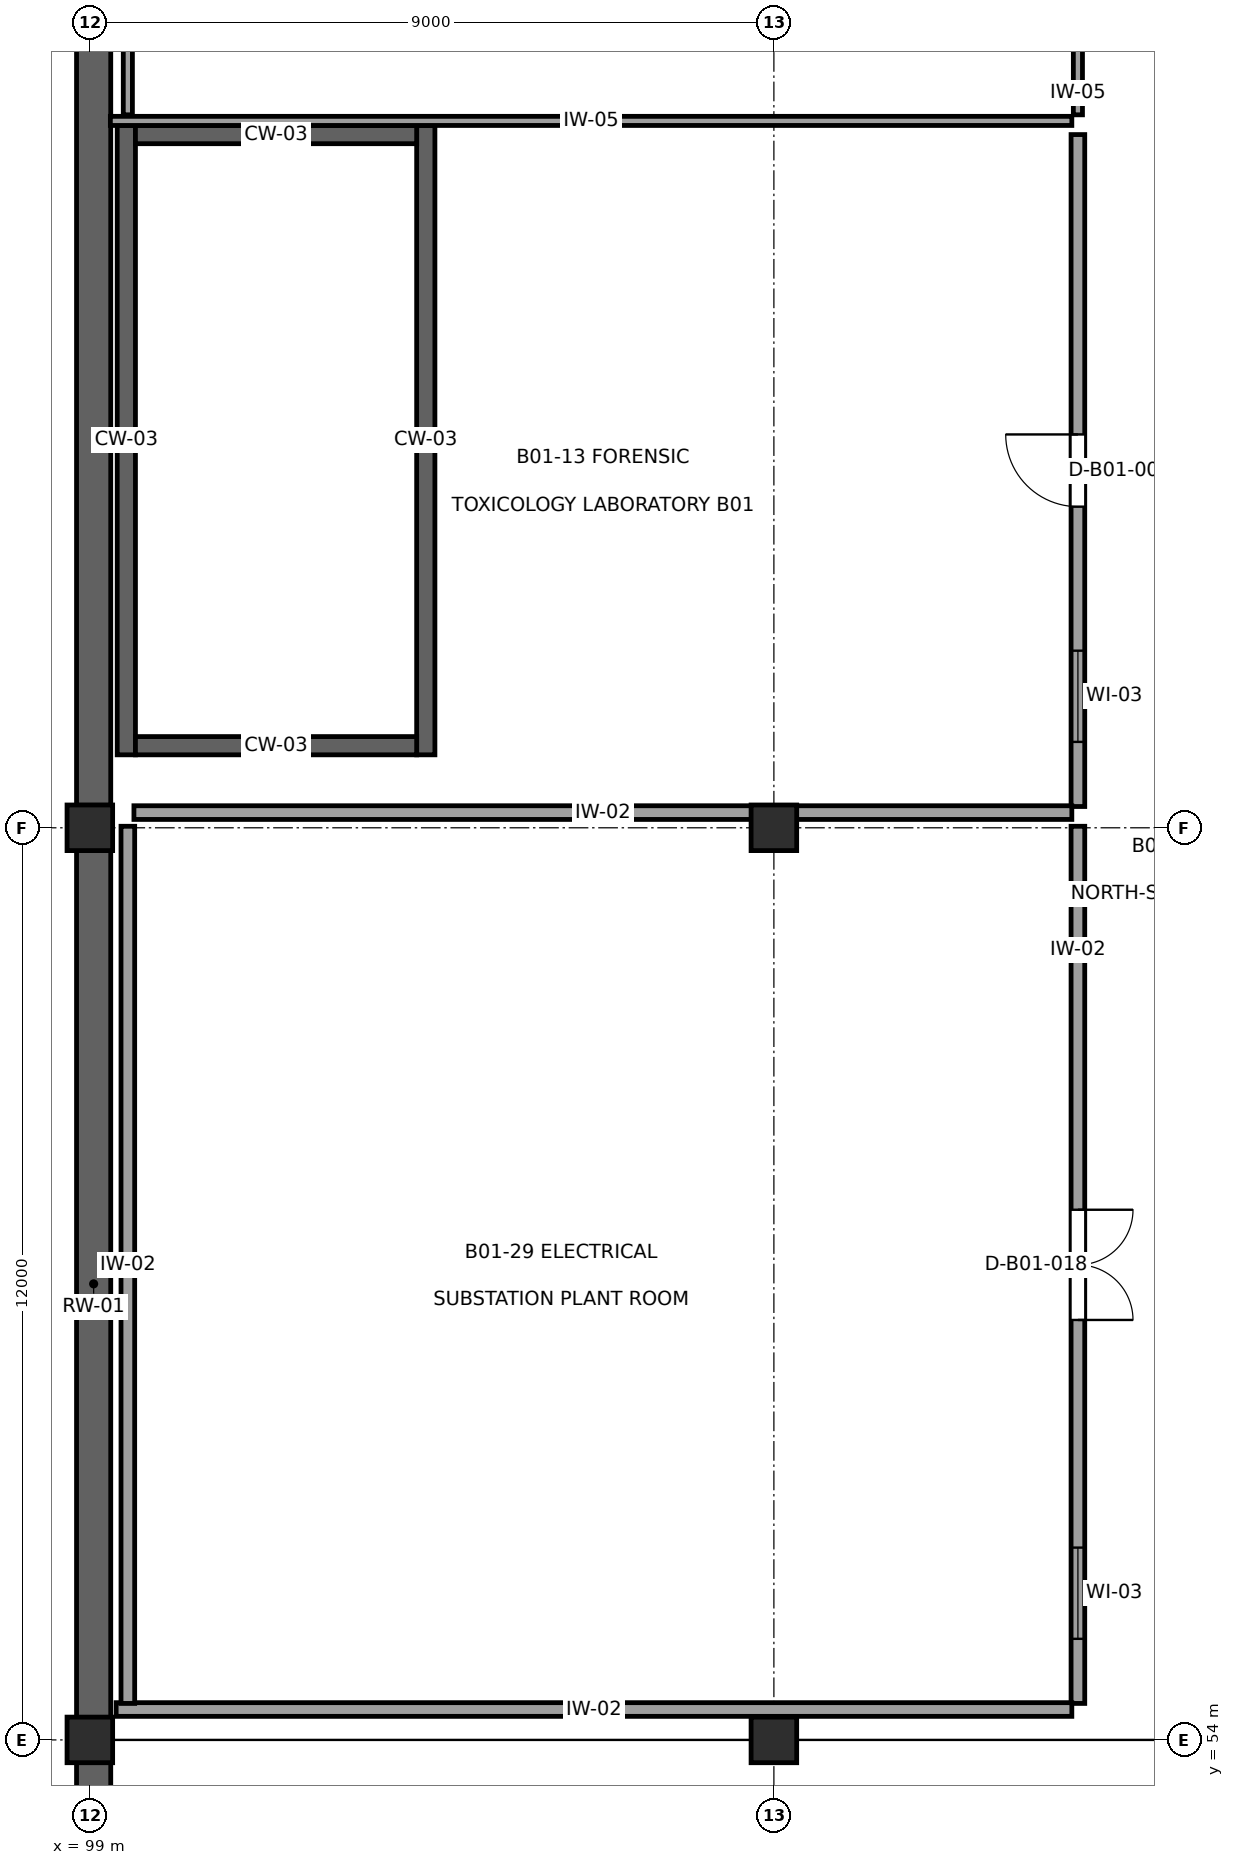
"""IFC4 building model, lengths in metres.
Left out: names, types, materials, properties, quantities, classifications, styles, units other than length and angle.
Written with IfcOpenShell. Run it as: python <this file> out.ifc"""

import sys

from ifc_helpers import new_model, si_unit, direction, frame, frame_2d, origin, origin_2d, place, context, subcontext, project, spatial, rectangle, extrude, element, fill, save


model = new_model("IFC4")
c1 = context("Model", 3, precision=1e-05, world=origin(), true_north=direction((0.0, 1.0)))
c2 = subcontext(c1, "Body", "Model", "MODEL_VIEW")
j1 = project(units=[si_unit("LENGTHUNIT", "METRE"), si_unit("PLANEANGLEUNIT", "RADIAN")], contexts=[c1])
p1 = place(None, origin())
s1 = spatial("IfcSite", under=j1, at=p1, CompositionType="ELEMENT")
p2 = place(p1, origin())
s2 = spatial("IfcBuilding", under=s1, at=p2, CompositionType="ELEMENT")
p3 = place(p2, frame((0.0, 0.0, -4.5)))
s3 = spatial("IfcBuildingStorey", under=s2, at=p3, CompositionType="ELEMENT", Elevation=-4.5)
for number, where, z_axis, x_axis in (
    (1, (99.0, 54.0, 0.0), (0.0, 0.0, 1.0), (1.0, 0.0, 0.0)),
    (2, (99.0, 66.0, 0.0), (0.0, 0.0, 1.0), (1.0, 0.0, 0.0)),
    (3, (108.0, 54.0, 0.0), (0.0, 0.0, 1.0), (1.0, 0.0, 0.0)),
    (4, (108.0, 66.0, 0.0), (0.0, 0.0, 1.0), (1.0, 0.0, 0.0)),
):
    element("IfcColumn", number, at=place(p3, frame(where, z_axis=z_axis, x_axis=x_axis)), inside=s3, PredefinedType="COLUMN", context=c2, shape_type="SweptSolid", body=[
        extrude(rectangle(XDim=0.6, YDim=0.6, at=origin_2d()), origin(), (0.0, 0.0, 1.0), 4.5),
    ])
p4 = place(p3, frame((99.05, 77.654, 0.0), z_axis=(0.0, 0.0, 1.0), x_axis=(0.0, -1.0, 0.0)))
e5 = element("IfcWall", 5, at=p4, inside=s3, PredefinedType="USERDEFINED", context=c2, shape_type="SweptSolid", body=[
    extrude(rectangle(XDim=11.358, YDim=0.45, at=frame_2d((5.679, 0.0))), origin(), (0.0, 0.0, 1.0), 4.32),
])
p5 = place(p3, frame((99.05, 65.704, 0.0), z_axis=(0.0, 0.0, 1.0), x_axis=(0.0, -1.0, 0.0)))
e6 = element("IfcWall", 6, at=p5, inside=s3, PredefinedType="USERDEFINED", context=c2, shape_type="SweptSolid", body=[
    extrude(rectangle(XDim=11.408, YDim=0.45, at=frame_2d((5.704, 0.0))), origin(), (0.0, 0.0, 1.0), 4.32),
])
p6 = place(p3, frame((99.05, 53.704, 0.0), z_axis=(0.0, 0.0, 1.0), x_axis=(0.0, -1.0, 0.0)))
e7 = element("IfcWall", 7, at=p6, inside=s3, PredefinedType="USERDEFINED", context=c2, shape_type="SweptSolid", body=[
    extrude(rectangle(XDim=11.358, YDim=0.45, at=frame_2d((5.679, 0.0))), origin(), (0.0, 0.0, 1.0), 4.32),
])
for number, where, z_axis, x_axis in (
    (8, (99.48, 66.96, 0.0), (0.0, 0.0, 1.0), (0.0, 1.0, 0.0)),
    (9, (103.42, 66.96, 0.0), (0.0, 0.0, 1.0), (0.0, 1.0, 0.0)),
):
    element("IfcWall", number, at=place(p3, frame(where, z_axis=z_axis, x_axis=x_axis)), inside=s3, PredefinedType="SHEAR", context=c2, shape_type="SweptSolid", body=[
        extrude(rectangle(XDim=8.28, YDim=0.24, at=frame_2d((4.14, 0.0))), origin(), (0.0, 0.0, 1.0), 4.31),
    ])
for number, where, z_axis, x_axis in (
    (10, (99.6, 67.08, 0.0), (0.0, 0.0, 1.0), (1.0, 0.0, 0.0)),
    (11, (99.6, 75.12, 0.0), (0.0, 0.0, 1.0), (1.0, 0.0, 0.0)),
):
    element("IfcWall", number, at=place(p3, frame(where, z_axis=z_axis, x_axis=x_axis)), inside=s3, PredefinedType="SHEAR", context=c2, shape_type="SweptSolid", body=[
        extrude(rectangle(XDim=3.7, YDim=0.24, at=frame_2d((1.85, 0.0))), origin(), (0.0, 0.0, 1.0), 4.31),
    ])
p7 = place(p3, frame((99.5, 75.38, 0.0), z_axis=(0.0, 0.0, 1.0), x_axis=(0.0, 1.0, 0.0)))
e12 = element("IfcWall", 12, at=p7, inside=s3, PredefinedType="PARTITIONING", context=c2, shape_type="SweptSolid", body=[
    extrude(rectangle(XDim=5.04, YDim=0.12, at=frame_2d((2.52, 0.0))), origin(), (0.0, 0.0, 1.0), 3.715),
])
p8 = place(p3, frame((112.0, 80.42, 0.0), z_axis=(0.0, 0.0, 1.0), x_axis=(0.0, -1.0, 0.0)))
e13 = element("IfcWall", 13, at=p8, inside=s3, PredefinedType="PARTITIONING", context=c2, shape_type="SweptSolid", body=[
    extrude(rectangle(XDim=5.04, YDim=0.12, at=frame_2d((2.52, 0.0))), origin(), (0.0, 0.0, 1.0), 4.14),
])
p9 = place(p8, frame((2.07, 0.0, 0.0)))
e14 = element("IfcOpeningElement", 14, at=p9, cuts=e13, PredefinedType="OPENING", context=c2, shape_type="SweptSolid", body=[
    extrude(rectangle(XDim=0.9, YDim=2.1, at=frame_2d((0.45, 1.05))), frame((0.0, 0.075, 0.0), z_axis=(0.0, -1.0, 0.0), x_axis=(1.0, 0.0, 0.0)), (0.0, 0.0, 1.0), 0.15),
])
p10 = place(p3, frame((111.92, 75.3, 0.0), z_axis=(0.0, 0.0, 1.0), x_axis=(-1.0, 0.0, 0.0)))
e15 = element("IfcWall", 15, at=p10, inside=s3, PredefinedType="PARTITIONING", context=c2, shape_type="SweptSolid", body=[
    extrude(rectangle(XDim=12.65, YDim=0.12, at=frame_2d((6.325, 0.0))), origin(), (0.0, 0.0, 1.0), 4.14),
])
p11 = place(p3, frame((112.0, 75.12, 0.0), z_axis=(0.0, 0.0, 1.0), x_axis=(0.0, -1.0, 0.0)))
e16 = element("IfcWall", 16, at=p11, inside=s3, PredefinedType="PARTITIONING", context=c2, shape_type="SweptSolid", body=[
    extrude(rectangle(XDim=8.84, YDim=0.18, at=frame_2d((4.42, 0.0))), origin(), (0.0, 0.0, 1.0), 4.14),
])
p12 = place(p11, frame((3.945, 0.0, 0.0)))
e17 = element("IfcOpeningElement", 17, at=p12, cuts=e16, PredefinedType="OPENING", context=c2, shape_type="SweptSolid", body=[
    extrude(rectangle(XDim=0.95, YDim=2.1, at=frame_2d((0.475, 1.05))), frame((0.0, 0.105, 0.0), z_axis=(0.0, -1.0, 0.0), x_axis=(1.0, 0.0, 0.0)), (0.0, 0.0, 1.0), 0.21),
])
p13 = place(p11, frame((6.79, 0.0, 1.05)))
e18 = element("IfcOpeningElement", 18, at=p13, cuts=e16, PredefinedType="OPENING", context=c2, shape_type="SweptSolid", body=[
    extrude(rectangle(XDim=1.2, YDim=1.0, at=frame_2d((0.6, 0.5))), frame((0.0, 0.105, 0.0), z_axis=(0.0, -1.0, 0.0), x_axis=(1.0, 0.0, 0.0)), (0.0, 0.0, 1.0), 0.21),
])
p14 = place(p3, frame((111.92, 66.2, 0.0), z_axis=(0.0, 0.0, 1.0), x_axis=(-1.0, 0.0, 0.0)))
e19 = element("IfcWall", 19, at=p14, inside=s3, PredefinedType="PARTITIONING", context=c2, shape_type="SweptSolid", body=[
    extrude(rectangle(XDim=12.34, YDim=0.18, at=frame_2d((6.17, 0.0))), origin(), (0.0, 0.0, 1.0), 3.595),
])
p15 = place(p3, frame((112.0, 66.02, 0.0), z_axis=(0.0, 0.0, 1.0), x_axis=(0.0, -1.0, 0.0)))
e20 = element("IfcWall", 20, at=p15, inside=s3, PredefinedType="PARTITIONING", context=c2, shape_type="SweptSolid", body=[
    extrude(rectangle(XDim=11.54, YDim=0.18, at=frame_2d((5.77, 0.0))), origin(), (0.0, 0.0, 1.0), 4.14),
])
p16 = place(p15, frame((5.045, 0.0, 0.0)))
e21 = element("IfcOpeningElement", 21, at=p16, cuts=e20, PredefinedType="OPENING", context=c2, shape_type="SweptSolid", body=[
    extrude(rectangle(XDim=1.45, YDim=2.3, at=frame_2d((0.725, 1.15))), frame((0.0, 0.105, 0.0), z_axis=(0.0, -1.0, 0.0), x_axis=(1.0, 0.0, 0.0)), (0.0, 0.0, 1.0), 0.21),
])
p17 = place(p15, frame((9.49, 0.0, 1.05)))
e22 = element("IfcOpeningElement", 22, at=p17, cuts=e20, PredefinedType="OPENING", context=c2, shape_type="SweptSolid", body=[
    extrude(rectangle(XDim=1.2, YDim=1.0, at=frame_2d((0.6, 0.5))), frame((0.0, 0.105, 0.0), z_axis=(0.0, -1.0, 0.0), x_axis=(1.0, 0.0, 0.0)), (0.0, 0.0, 1.0), 0.21),
])
p18 = place(p3, frame((111.92, 54.4, 0.0), z_axis=(0.0, 0.0, 1.0), x_axis=(-1.0, 0.0, 0.0)))
e23 = element("IfcWall", 23, at=p18, inside=s3, PredefinedType="PARTITIONING", context=c2, shape_type="SweptSolid", body=[
    extrude(rectangle(XDim=12.574, YDim=0.18, at=frame_2d((6.287, 0.0))), origin(), (0.0, 0.0, 1.0), 4.14),
])
p19 = place(p3, frame((99.5, 54.48, 0.0), z_axis=(0.0, 0.0, 1.0), x_axis=(0.0, 1.0, 0.0)))
e24 = element("IfcWall", 24, at=p19, inside=s3, PredefinedType="PARTITIONING", context=c2, shape_type="SweptSolid", body=[
    extrude(rectangle(XDim=11.54, YDim=0.18, at=frame_2d((5.77, 0.0))), origin(), (0.0, 0.0, 1.0), 3.835),
])
p20 = place(p12, frame((0.95, 0.0, 0.0), z_axis=(0.0, 0.0, 1.0), x_axis=(-1.0, 0.0, 0.0)))
e25 = element("IfcDoor", 25, at=p20, inside=s3, OperationType="SINGLE_SWING_LEFT", PredefinedType="DOOR", context=c2, shape_type="SweptSolid", body=[
    extrude(rectangle(XDim=0.95, YDim=2.1, at=frame_2d((0.475, 1.05))), frame((0.0, 0.025, 0.0), z_axis=(0.0, -1.0, 0.0), x_axis=(1.0, 0.0, 0.0)), (0.0, 0.0, 1.0), 0.05),
])
fill(e17, e25)
p21 = place(p13, origin())
e26 = element("IfcWindow", 26, at=p21, inside=s3, PartitioningType="SINGLE_PANEL", PredefinedType="WINDOW", context=c2, shape_type="SweptSolid", body=[
    extrude(rectangle(XDim=1.2, YDim=1.0, at=frame_2d((0.6, 0.5))), frame((0.0, 0.03, 0.0), z_axis=(0.0, -1.0, 0.0), x_axis=(1.0, 0.0, 0.0)), (0.0, 0.0, 1.0), 0.06),
])
fill(e18, e26)
p22 = place(p16, origin())
e27 = element("IfcDoor", 27, at=p22, inside=s3, OperationType="DOUBLE_DOOR_SINGLE_SWING", PredefinedType="DOOR", context=c2, shape_type="SweptSolid", body=[
    extrude(rectangle(XDim=1.45, YDim=2.3, at=frame_2d((0.725, 1.15))), frame((0.0, 0.025, 0.0), z_axis=(0.0, -1.0, 0.0), x_axis=(1.0, 0.0, 0.0)), (0.0, 0.0, 1.0), 0.05),
])
fill(e21, e27)
p23 = place(p17, origin())
e28 = element("IfcWindow", 28, at=p23, inside=s3, PartitioningType="SINGLE_PANEL", PredefinedType="WINDOW", context=c2, shape_type="SweptSolid", body=[
    extrude(rectangle(XDim=1.2, YDim=1.0, at=frame_2d((0.6, 0.5))), frame((0.0, 0.03, 0.0), z_axis=(0.0, -1.0, 0.0), x_axis=(1.0, 0.0, 0.0)), (0.0, 0.0, 1.0), 0.06),
])
fill(e22, e28)
save(model, sys.argv[1])
